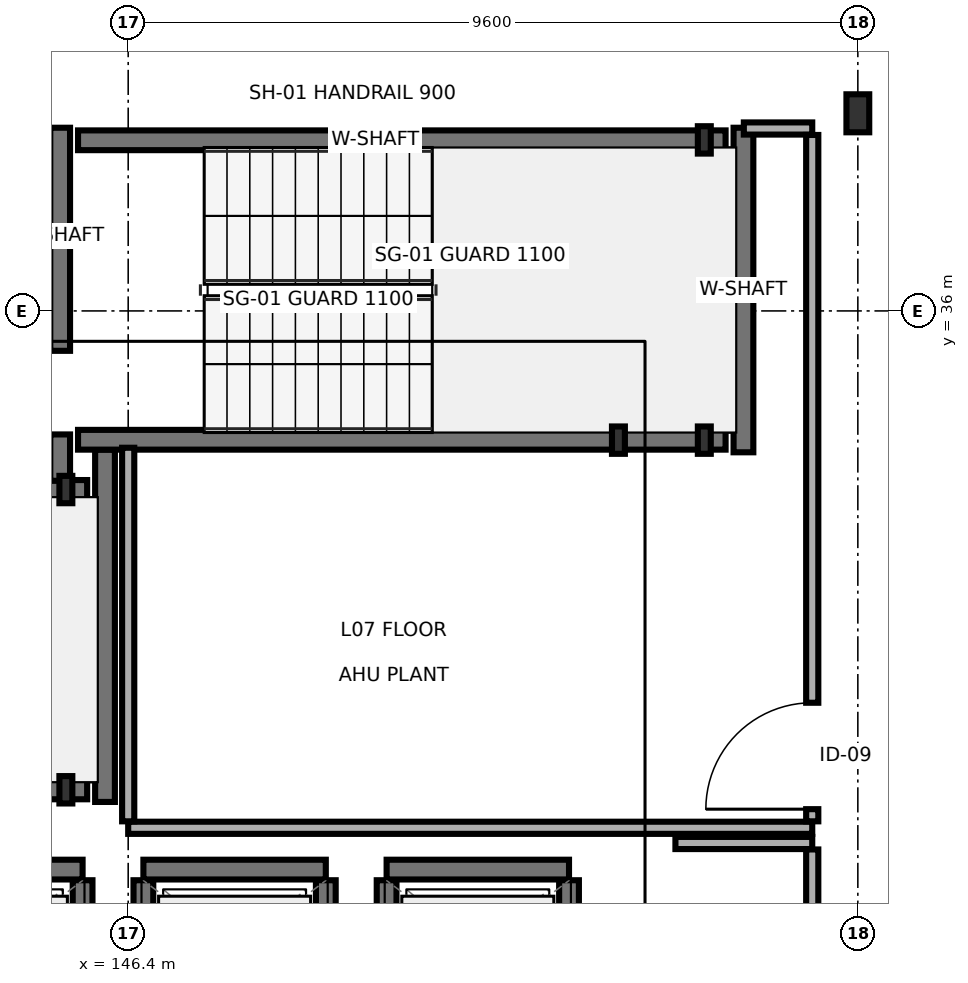
"""IFC4 building model, lengths in metres.
Left out: names, types, materials, properties, quantities, classifications, styles, units other than length and angle.
Written with IfcOpenShell. Run it as: python <this file> out.ifc"""

import sys

from ifc_helpers import new_model, si_unit, direction, frame, frame_2d, origin, origin_2d, place, context, subcontext, project, spatial, rectangle, i_section, extrude, element, fill, save


model = new_model("IFC4")
c1 = context("Model", 3, precision=1e-05, world=origin(), true_north=direction((0.0, 1.0)))
c2 = subcontext(c1, "Body", "Model", "MODEL_VIEW")
j1 = project(units=[si_unit("LENGTHUNIT", "METRE"), si_unit("PLANEANGLEUNIT", "RADIAN")], contexts=[c1])
p1 = place(None, origin())
s1 = spatial("IfcSite", under=j1, at=p1, CompositionType="ELEMENT")
p2 = place(p1, origin())
s2 = spatial("IfcBuilding", under=s1, at=p2, CompositionType="ELEMENT")
p3 = place(p2, frame((0.0, 0.0, 24.9)))
s3 = spatial("IfcBuildingStorey", under=s2, at=p3, CompositionType="ELEMENT", Elevation=24.9)
for number, where, z_axis, x_axis in (
    (1, (145.58, 29.7, 0.0), (0.0, 0.0, 1.0), (1.0, 0.0, 0.0)),
    (2, (145.58, 33.65, 0.0), (0.0, 0.0, 1.0), (1.0, 0.0, 0.0)),
    (3, (152.85, 34.3, 0.0), (0.0, 0.0, 1.0), (1.0, 0.0, 0.0)),
    (4, (153.98, 34.3, 0.0), (0.0, 0.0, 1.0), (1.0, 0.0, 0.0)),
    (5, (153.98, 38.25, 0.0), (0.0, 0.0, 1.0), (1.0, 0.0, 0.0)),
):
    element("IfcColumn", number, at=place(p3, frame(where, z_axis=z_axis, x_axis=x_axis)), inside=s3, PredefinedType="PILASTER", context=c2, shape_type="SweptSolid", body=[
        extrude(i_section(OverallWidth=0.17, OverallDepth=0.36, WebThickness=0.008, FlangeThickness=0.013, FilletRadius=0.018, at=origin_2d()), origin(), (0.0, 0.0, 1.0), 3.4),
    ])
p4 = place(p3, frame((156.0, 38.6, 0.0), z_axis=(0.0, 0.0, 1.0), x_axis=(1.0, 0.0, 0.0)))
e6 = element("IfcColumn", 6, at=p4, inside=s3, PredefinedType="COLUMN", context=c2, shape_type="SweptSolid", body=[
    extrude(i_section(OverallWidth=0.3, OverallDepth=0.5, WebThickness=0.014, FlangeThickness=0.028, FilletRadius=0.027, at=origin_2d()), origin(), (0.0, 0.0, 1.0), 3.4),
])
p5 = place(p3, frame((146.095, 29.54, 0.0), z_axis=(0.0, 0.0, 1.0), x_axis=(0.0, 1.0, 0.0)))
e7 = element("IfcWall", 7, at=p5, inside=s3, PredefinedType="SHEAR", context=c2, shape_type="SweptSolid", body=[
    extrude(rectangle(XDim=4.635, YDim=0.26, at=frame_2d((2.317, 0.0))), origin(), (0.0, 0.0, 1.0), 3.19),
])
for number, where, z_axis, x_axis in (
    (8, (137.34, 29.705, 0.0), (0.0, 0.0, 1.0), (1.0, 0.0, 0.0)),
    (9, (137.34, 33.645, 0.0), (0.0, 0.0, 1.0), (1.0, 0.0, 0.0)),
):
    element("IfcWall", number, at=place(p3, frame(where, z_axis=z_axis, x_axis=x_axis)), inside=s3, PredefinedType="SHEAR", context=c2, shape_type="SweptSolid", body=[
        extrude(rectangle(XDim=8.52, YDim=0.26, at=frame_2d((4.26, 0.0))), origin(), (0.0, 0.0, 1.0), 3.19),
    ])
p6 = place(p3, frame((145.505, 33.765, 0.0), z_axis=(0.0, 0.0, 1.0), x_axis=(0.0, 1.0, 0.0)))
e10 = element("IfcWall", 10, at=p6, inside=s3, PredefinedType="SHEAR", context=c2, shape_type="SweptSolid", body=[
    extrude(rectangle(XDim=4.645, YDim=0.26, at=frame_2d((2.323, 0.0))), origin(), (0.0, 0.0, 1.0), 3.19),
])
p7 = place(p6, frame((0.61, 0.0, 0.0)))
e11 = element("IfcOpeningElement", 11, at=p7, cuts=e10, PredefinedType="OPENING", context=c2, shape_type="SweptSolid", body=[
    extrude(rectangle(XDim=1.1, YDim=2.2, at=frame_2d((0.55, 1.1))), frame((0.0, 0.14, 0.0), z_axis=(0.0, -1.0, 0.0), x_axis=(1.0, 0.0, 0.0)), (0.0, 0.0, 1.0), 0.28),
])
p8 = place(p3, frame((154.495, 34.14, 0.0), z_axis=(0.0, 0.0, 1.0), x_axis=(0.0, 1.0, 0.0)))
e12 = element("IfcWall", 12, at=p8, inside=s3, PredefinedType="SHEAR", context=c2, shape_type="SweptSolid", body=[
    extrude(rectangle(XDim=4.27, YDim=0.26, at=frame_2d((2.135, 0.0))), origin(), (0.0, 0.0, 1.0), 3.19),
])
for number, where, z_axis, x_axis in (
    (13, (145.74, 34.305, 0.0), (0.0, 0.0, 1.0), (1.0, 0.0, 0.0)),
    (14, (145.74, 38.245, 0.0), (0.0, 0.0, 1.0), (1.0, 0.0, 0.0)),
):
    element("IfcWall", number, at=place(p3, frame(where, z_axis=z_axis, x_axis=x_axis)), inside=s3, PredefinedType="SHEAR", context=c2, shape_type="SweptSolid", body=[
        extrude(rectangle(XDim=8.52, YDim=0.26, at=frame_2d((4.26, 0.0))), origin(), (0.0, 0.0, 1.0), 3.19),
    ])
p9 = place(p3, frame((143.4, 28.65, 0.0), z_axis=(0.0, 0.0, 1.0), x_axis=(1.0, 0.0, 0.0)))
e15 = element("IfcWall", 15, at=p9, inside=s3, PredefinedType="SHEAR", context=c2, shape_type="SweptSolid", body=[
    extrude(rectangle(XDim=2.4, YDim=0.26, at=frame_2d((1.2, 0.0))), origin(), (0.0, 0.0, 1.0), 3.19),
])
p10 = place(p3, frame((145.8, 26.69, 0.0), z_axis=(0.0, 0.0, 1.0), x_axis=(0.0, 1.0, 0.0)))
e16 = element("IfcWall", 16, at=p10, inside=s3, PredefinedType="SHEAR", context=c2, shape_type="SweptSolid", body=[
    extrude(rectangle(XDim=1.82, YDim=0.26, at=frame_2d((0.91, 0.0))), origin(), (0.0, 0.0, 1.0), 3.19),
])
p11 = place(p3, frame((146.6, 28.65, 0.0), z_axis=(0.0, 0.0, 1.0), x_axis=(1.0, 0.0, 0.0)))
e17 = element("IfcWall", 17, at=p11, inside=s3, PredefinedType="SHEAR", context=c2, shape_type="SweptSolid", body=[
    extrude(rectangle(XDim=2.4, YDim=0.26, at=frame_2d((1.2, 0.0))), origin(), (0.0, 0.0, 1.0), 3.19),
])
for number, where, z_axis, x_axis in (
    (18, (146.6, 26.69, 0.0), (0.0, 0.0, 1.0), (0.0, 1.0, 0.0)),
    (19, (149.0, 26.69, 0.0), (0.0, 0.0, 1.0), (0.0, 1.0, 0.0)),
):
    element("IfcWall", number, at=place(p3, frame(where, z_axis=z_axis, x_axis=x_axis)), inside=s3, PredefinedType="SHEAR", context=c2, shape_type="SweptSolid", body=[
        extrude(rectangle(XDim=1.82, YDim=0.26, at=frame_2d((0.91, 0.0))), origin(), (0.0, 0.0, 1.0), 3.19),
    ])
p12 = place(p3, frame((149.8, 28.65, 0.0), z_axis=(0.0, 0.0, 1.0), x_axis=(1.0, 0.0, 0.0)))
e20 = element("IfcWall", 20, at=p12, inside=s3, PredefinedType="SHEAR", context=c2, shape_type="SweptSolid", body=[
    extrude(rectangle(XDim=2.4, YDim=0.26, at=frame_2d((1.2, 0.0))), origin(), (0.0, 0.0, 1.0), 3.19),
])
for number, where, z_axis, x_axis in (
    (21, (149.8, 26.69, 0.0), (0.0, 0.0, 1.0), (0.0, 1.0, 0.0)),
    (22, (152.2, 26.69, 0.0), (0.0, 0.0, 1.0), (0.0, 1.0, 0.0)),
):
    element("IfcWall", number, at=place(p3, frame(where, z_axis=z_axis, x_axis=x_axis)), inside=s3, PredefinedType="SHEAR", context=c2, shape_type="SweptSolid", body=[
        extrude(rectangle(XDim=1.82, YDim=0.26, at=frame_2d((0.91, 0.0))), origin(), (0.0, 0.0, 1.0), 3.19),
    ])
p13 = place(p3, frame((146.4, 29.2, 0.0), z_axis=(0.0, 0.0, 1.0), x_axis=(1.0, 0.0, 0.0)))
e23 = element("IfcWall", 23, at=p13, inside=s3, PredefinedType="PARTITIONING", context=c2, shape_type="SweptSolid", body=[
    extrude(rectangle(XDim=9.0, YDim=0.16, at=frame_2d((4.5, 0.0))), origin(), (0.0, 0.0, 1.0), 3.19),
])
p14 = place(p3, frame((146.4, 29.285, 0.0), z_axis=(0.0, 0.0, 1.0), x_axis=(0.0, 1.0, 0.0)))
e24 = element("IfcWall", 24, at=p14, inside=s3, PredefinedType="PARTITIONING", context=c2, shape_type="SweptSolid", body=[
    extrude(rectangle(XDim=4.915, YDim=0.16, at=frame_2d((2.458, 0.0))), origin(), (0.0, 0.0, 1.0), 3.19),
])
p15 = place(p3, frame((154.5, 38.4, 0.0), z_axis=(0.0, 0.0, 1.0), x_axis=(1.0, 0.0, 0.0)))
e25 = element("IfcWall", 25, at=p15, inside=s3, PredefinedType="PARTITIONING", context=c2, shape_type="SweptSolid", body=[
    extrude(rectangle(XDim=0.9, YDim=0.16, at=frame_2d((0.45, 0.0))), origin(), (0.0, 0.0, 1.0), 2.725),
])
p16 = place(p3, frame((155.4, 29.285, 0.0), z_axis=(0.0, 0.0, 1.0), x_axis=(0.0, 1.0, 0.0)))
e26 = element("IfcWall", 26, at=p16, inside=s3, PredefinedType="PARTITIONING", context=c2, shape_type="SweptSolid", body=[
    extrude(rectangle(XDim=9.03, YDim=0.16, at=frame_2d((4.515, 0.0))), origin(), (0.0, 0.0, 1.0), 3.19),
])
p17 = place(p16, frame((0.16, 0.0, 0.0)))
e27 = element("IfcOpeningElement", 27, at=p17, cuts=e26, PredefinedType="OPENING", context=c2, shape_type="SweptSolid", body=[
    extrude(rectangle(XDim=1.4, YDim=2.2, at=frame_2d((0.7, 1.1))), frame((0.0, 0.09, 0.0), z_axis=(0.0, -1.0, 0.0), x_axis=(1.0, 0.0, 0.0)), (0.0, 0.0, 1.0), 0.18),
])
p18 = place(p3, frame((153.6, 29.0, 0.0), z_axis=(0.0, 0.0, 1.0), x_axis=(1.0, 0.0, 0.0)))
e28 = element("IfcWall", 28, at=p18, inside=s3, PredefinedType="PARTITIONING", context=c2, shape_type="SweptSolid", body=[
    extrude(rectangle(XDim=1.8, YDim=0.16, at=frame_2d((0.9, 0.0))), origin(), (0.0, 0.0, 1.0), 3.19),
])
p19 = place(p3, frame((155.4, 16.885, 0.0), z_axis=(0.0, 0.0, 1.0), x_axis=(0.0, 1.0, 0.0)))
e29 = element("IfcWall", 29, at=p19, inside=s3, PredefinedType="PARTITIONING", context=c2, shape_type="SweptSolid", body=[
    extrude(rectangle(XDim=12.03, YDim=0.16, at=frame_2d((6.015, 0.0))), origin(), (0.0, 0.0, 1.0), 2.725),
])
p20 = place(p19, frame((5.365, 0.0, 0.0)))
e30 = element("IfcOpeningElement", 30, at=p20, cuts=e29, PredefinedType="OPENING", context=c2, shape_type="SweptSolid", body=[
    extrude(rectangle(XDim=1.3, YDim=2.2, at=frame_2d((0.65, 1.1))), frame((0.0, 0.09, 0.0), z_axis=(0.0, -1.0, 0.0), x_axis=(1.0, 0.0, 0.0)), (0.0, 0.0, 1.0), 0.18),
])
p21 = place(p7, origin())
e31 = element("IfcDoor", 31, at=p21, inside=s3, OperationType="SINGLE_SWING_RIGHT", PredefinedType="DOOR", context=c2, shape_type="SweptSolid", body=[
    extrude(rectangle(XDim=1.1, YDim=2.2, at=frame_2d((0.55, 1.1))), frame((0.0, 0.025, 0.0), z_axis=(0.0, -1.0, 0.0), x_axis=(1.0, 0.0, 0.0)), (0.0, 0.0, 1.0), 0.05),
])
fill(e11, e31)
p22 = place(p17, origin())
e32 = element("IfcDoor", 32, at=p22, inside=s3, OperationType="SINGLE_SWING_LEFT", PredefinedType="DOOR", context=c2, shape_type="SweptSolid", body=[
    extrude(rectangle(XDim=1.4, YDim=2.2, at=frame_2d((0.7, 1.1))), frame((0.0, 0.025, 0.0), z_axis=(0.0, -1.0, 0.0), x_axis=(1.0, 0.0, 0.0)), (0.0, 0.0, 1.0), 0.05),
])
fill(e27, e32)
save(model, sys.argv[1])
